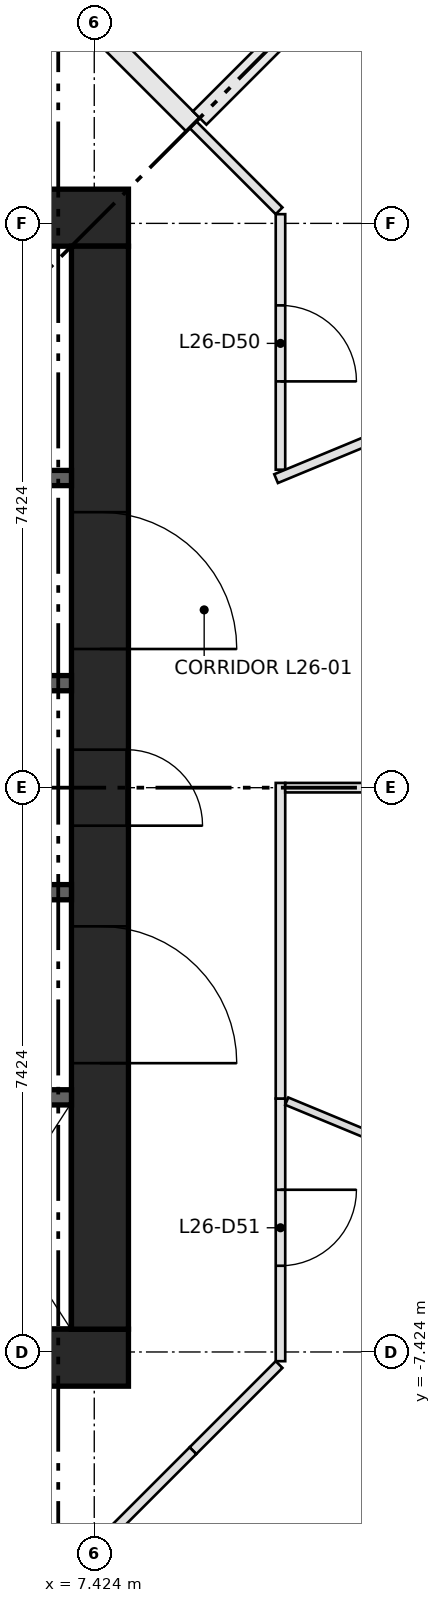
"""IFC4 building model, lengths in metres.
Left out: names, types, materials, properties, quantities, classifications, styles, units other than length and angle.
Written with IfcOpenShell. Run it as: python <this file> out.ifc"""

import sys

from ifc_helpers import new_model, si_unit, direction, frame, frame_2d, origin, place, context, subcontext, project, spatial, rectangle, extrude, element, fill, save


model = new_model("IFC4")
c1 = context("Model", 3, precision=1e-05, world=origin(), true_north=direction((0.0, 1.0)))
c2 = subcontext(c1, "Body", "Model", "MODEL_VIEW")
j1 = project(units=[si_unit("LENGTHUNIT", "METRE"), si_unit("PLANEANGLEUNIT", "RADIAN")], contexts=[c1])
p1 = place(None, origin())
s1 = spatial("IfcSite", under=j1, at=p1, CompositionType="ELEMENT")
p2 = place(p1, origin())
s2 = spatial("IfcBuilding", under=s1, at=p2, CompositionType="ELEMENT")
p3 = place(p2, frame((0.0, 0.0, 101.95)))
s3 = spatial("IfcBuildingStorey", under=s2, at=p3, CompositionType="ELEMENT", Elevation=101.95)
for number, where, z_axis, x_axis in (
    (1, (-7.874, -7.499, 0.0), (0.0, 0.0, 1.0), (1.0, 0.0, 0.0)),
    (2, (-7.874, 7.499, 0.0), (0.0, 0.0, 1.0), (1.0, 0.0, 0.0)),
):
    element("IfcWall", number, at=place(p3, frame(where, z_axis=z_axis, x_axis=x_axis)), inside=s3, PredefinedType="SHEAR", context=c2, shape_type="SweptSolid", body=[
        extrude(rectangle(XDim=15.748, YDim=0.75, at=frame_2d((7.874, 0.0))), origin(), (0.0, 0.0, 1.0), 3.65),
    ])
p4 = place(p3, frame((7.499, -7.124, 0.0), z_axis=(0.0, 0.0, 1.0), x_axis=(0.0, 1.0, 0.0)))
e3 = element("IfcWall", 3, at=p4, inside=s3, PredefinedType="SHEAR", context=c2, shape_type="SweptSolid", body=[
    extrude(rectangle(XDim=14.248, YDim=0.75, at=frame_2d((7.124, 0.0))), origin(), (0.0, 0.0, 1.0), 3.65),
])
p5 = place(p4, frame((6.624, 0.0, 0.0)))
e4 = element("IfcOpeningElement", 4, at=p5, cuts=e3, PredefinedType="OPENING", context=c2, shape_type="SweptSolid", body=[
    extrude(rectangle(XDim=1.0, YDim=2.1, at=frame_2d((0.5, 1.05))), frame((0.0, 0.385, 0.0), z_axis=(0.0, -1.0, 0.0), x_axis=(1.0, 0.0, 0.0)), (0.0, 0.0, 1.0), 0.77),
])
p6 = place(p4, frame((3.5, 0.0, 0.0)))
e5 = element("IfcOpeningElement", 5, at=p6, cuts=e3, PredefinedType="OPENING", context=c2, shape_type="SweptSolid", body=[
    extrude(rectangle(XDim=1.8, YDim=2.1, at=frame_2d((0.9, 1.05))), frame((0.0, 0.385, 0.0), z_axis=(0.0, -1.0, 0.0), x_axis=(1.0, 0.0, 0.0)), (0.0, 0.0, 1.0), 0.77),
])
p7 = place(p4, frame((8.948, 0.0, 0.0)))
e6 = element("IfcOpeningElement", 6, at=p7, cuts=e3, PredefinedType="OPENING", context=c2, shape_type="SweptSolid", body=[
    extrude(rectangle(XDim=1.8, YDim=2.1, at=frame_2d((0.9, 1.05))), frame((0.0, 0.385, 0.0), z_axis=(0.0, -1.0, 0.0), x_axis=(1.0, 0.0, 0.0)), (0.0, 0.0, 1.0), 0.77),
])
p8 = place(p3, frame((-7.124, -4.074, 0.0), z_axis=(0.0, 0.0, 1.0), x_axis=(1.0, 0.0, 0.0)))
e7 = element("IfcWall", 7, at=p8, inside=s3, PredefinedType="SHEAR", context=c2, shape_type="SweptSolid", body=[
    extrude(rectangle(XDim=14.248, YDim=0.2, at=frame_2d((7.124, 0.0))), origin(), (0.0, 0.0, 1.0), 3.3),
])
p9 = place(p8, frame((1.069, 0.0, 0.0)))
e8 = element("IfcOpeningElement", 8, at=p9, cuts=e7, PredefinedType="OPENING", context=c2, shape_type="SweptSolid", body=[
    extrude(rectangle(XDim=1.1, YDim=2.1, at=frame_2d((0.55, 1.05))), frame((0.0, 0.11, 0.0), z_axis=(0.0, -1.0, 0.0), x_axis=(1.0, 0.0, 0.0)), (0.0, 0.0, 1.0), 0.22),
])
p10 = place(p8, frame((4.206, 0.0, 0.0)))
e9 = element("IfcOpeningElement", 9, at=p10, cuts=e7, PredefinedType="OPENING", context=c2, shape_type="SweptSolid", body=[
    extrude(rectangle(XDim=1.1, YDim=2.1, at=frame_2d((0.55, 1.05))), frame((0.0, 0.11, 0.0), z_axis=(0.0, -1.0, 0.0), x_axis=(1.0, 0.0, 0.0)), (0.0, 0.0, 1.0), 0.22),
])
p11 = place(p8, frame((6.808, 0.0, 0.0)))
e10 = element("IfcOpeningElement", 10, at=p11, cuts=e7, PredefinedType="OPENING", context=c2, shape_type="SweptSolid", body=[
    extrude(rectangle(XDim=1.0, YDim=2.1, at=frame_2d((0.5, 1.05))), frame((0.0, 0.11, 0.0), z_axis=(0.0, -1.0, 0.0), x_axis=(1.0, 0.0, 0.0)), (0.0, 0.0, 1.0), 0.22),
])
p12 = place(p8, frame((8.777, 0.0, 0.0)))
e11 = element("IfcOpeningElement", 11, at=p12, cuts=e7, PredefinedType="OPENING", context=c2, shape_type="SweptSolid", body=[
    extrude(rectangle(XDim=1.0, YDim=2.1, at=frame_2d((0.5, 1.05))), frame((0.0, 0.11, 0.0), z_axis=(0.0, -1.0, 0.0), x_axis=(1.0, 0.0, 0.0)), (0.0, 0.0, 1.0), 0.22),
])
p13 = place(p8, frame((10.745, 0.0, 0.0)))
e12 = element("IfcOpeningElement", 12, at=p13, cuts=e7, PredefinedType="OPENING", context=c2, shape_type="SweptSolid", body=[
    extrude(rectangle(XDim=1.0, YDim=2.1, at=frame_2d((0.5, 1.05))), frame((0.0, 0.11, 0.0), z_axis=(0.0, -1.0, 0.0), x_axis=(1.0, 0.0, 0.0)), (0.0, 0.0, 1.0), 0.22),
])
p14 = place(p8, frame((12.714, 0.0, 0.0)))
e13 = element("IfcOpeningElement", 13, at=p14, cuts=e7, PredefinedType="OPENING", context=c2, shape_type="SweptSolid", body=[
    extrude(rectangle(XDim=1.0, YDim=2.1, at=frame_2d((0.5, 1.05))), frame((0.0, 0.11, 0.0), z_axis=(0.0, -1.0, 0.0), x_axis=(1.0, 0.0, 0.0)), (0.0, 0.0, 1.0), 0.22),
])
p15 = place(p3, frame((0.0, 4.074, 0.0), z_axis=(0.0, 0.0, 1.0), x_axis=(1.0, 0.0, 0.0)))
e14 = element("IfcWall", 14, at=p15, inside=s3, PredefinedType="SHEAR", context=c2, shape_type="SweptSolid", body=[
    extrude(rectangle(XDim=7.124, YDim=0.2, at=frame_2d((3.562, 0.0))), origin(), (0.0, 0.0, 1.0), 3.3),
])
p16 = place(p15, frame((0.754, 0.0, 0.0)))
e15 = element("IfcOpeningElement", 15, at=p16, cuts=e14, PredefinedType="OPENING", context=c2, shape_type="SweptSolid", body=[
    extrude(rectangle(XDim=1.0, YDim=2.1, at=frame_2d((0.5, 1.05))), frame((0.0, 0.11, 0.0), z_axis=(0.0, -1.0, 0.0), x_axis=(1.0, 0.0, 0.0)), (0.0, 0.0, 1.0), 0.22),
])
p17 = place(p15, frame((3.407, 0.0, 0.0)))
e16 = element("IfcOpeningElement", 16, at=p17, cuts=e14, PredefinedType="OPENING", context=c2, shape_type="SweptSolid", body=[
    extrude(rectangle(XDim=1.0, YDim=2.1, at=frame_2d((0.5, 1.05))), frame((0.0, 0.11, 0.0), z_axis=(0.0, -1.0, 0.0), x_axis=(1.0, 0.0, 0.0)), (0.0, 0.0, 1.0), 0.22),
])
p18 = place(p15, frame((5.79, 0.0, 0.0)))
e17 = element("IfcOpeningElement", 17, at=p18, cuts=e14, PredefinedType="OPENING", context=c2, shape_type="SweptSolid", body=[
    extrude(rectangle(XDim=0.8, YDim=2.1, at=frame_2d((0.4, 1.05))), frame((0.0, 0.11, 0.0), z_axis=(0.0, -1.0, 0.0), x_axis=(1.0, 0.0, 0.0)), (0.0, 0.0, 1.0), 0.22),
])
for number, where, z_axis, x_axis in (
    (18, (4.374, -1.375, 0.0), (0.0, 0.0, 1.0), (1.0, 0.0, 0.0)),
    (19, (4.374, 1.375, 0.0), (0.0, 0.0, 1.0), (1.0, 0.0, 0.0)),
):
    element("IfcWall", number, at=place(p3, frame(where, z_axis=z_axis, x_axis=x_axis)), inside=s3, PredefinedType="SHEAR", context=c2, shape_type="SweptSolid", body=[
        extrude(rectangle(XDim=2.75, YDim=0.2, at=frame_2d((1.375, 0.0))), origin(), (0.0, 0.0, 1.0), 3.3),
    ])
p19 = place(p3, frame((8.722, 8.722, 0.0), z_axis=(0.0, 0.0, 1.0), x_axis=(0.70718294931, -0.707030604857, 0.0)))
e20 = element("IfcWall", 20, at=p19, inside=s3, PredefinedType="PARTITIONING", context=c2, shape_type="SweptSolid", body=[
    extrude(rectangle(XDim=1.603, YDim=0.125, at=frame_2d((0.801, 0.0))), origin(), (0.0, 0.0, 1.0), 3.3),
])
p20 = place(p3, frame((9.874, 7.545, 0.0), z_axis=(0.0, 0.0, 1.0), x_axis=(0.0, -1.0, 0.0)))
e21 = element("IfcWall", 21, at=p20, inside=s3, PredefinedType="PARTITIONING", context=c2, shape_type="SweptSolid", body=[
    extrude(rectangle(XDim=3.362, YDim=0.125, at=frame_2d((1.681, 0.0))), origin(), (0.0, 0.0, 1.0), 3.3),
])
p21 = place(p20, frame((1.2, 0.0, 0.0)))
e22 = element("IfcOpeningElement", 22, at=p21, cuts=e21, PredefinedType="OPENING", context=c2, shape_type="SweptSolid", body=[
    extrude(rectangle(XDim=1.0, YDim=2.1, at=frame_2d((0.5, 1.05))), frame((0.0, 0.073, 0.0), z_axis=(0.0, -1.0, 0.0), x_axis=(1.0, 0.0, 0.0)), (0.0, 0.0, 1.0), 0.145),
])
p22 = place(p3, frame((9.856, -7.589, 0.0), z_axis=(0.0, 0.0, 1.0), x_axis=(-0.70718294931, -0.707030604857, 0.0)))
e23 = element("IfcWall", 23, at=p22, inside=s3, PredefinedType="PARTITIONING", context=c2, shape_type="SweptSolid", body=[
    extrude(rectangle(XDim=1.603, YDim=0.125, at=frame_2d((0.801, 0.0))), origin(), (0.0, 0.0, 1.0), 3.3),
])
p23 = place(p3, frame((9.874, -4.09, 0.0), z_axis=(0.0, 0.0, 1.0), x_axis=(0.0, -1.0, 0.0)))
e24 = element("IfcWall", 24, at=p23, inside=s3, PredefinedType="PARTITIONING", context=c2, shape_type="SweptSolid", body=[
    extrude(rectangle(XDim=3.455, YDim=0.125, at=frame_2d((1.728, 0.0))), origin(), (0.0, 0.0, 1.0), 3.3),
])
p24 = place(p23, frame((1.2, 0.0, 0.0)))
e25 = element("IfcOpeningElement", 25, at=p24, cuts=e24, PredefinedType="OPENING", context=c2, shape_type="SweptSolid", body=[
    extrude(rectangle(XDim=1.0, YDim=2.1, at=frame_2d((0.5, 1.05))), frame((0.0, 0.073, 0.0), z_axis=(0.0, -1.0, 0.0), x_axis=(1.0, 0.0, 0.0)), (0.0, 0.0, 1.0), 0.145),
])
p25 = place(p3, frame((9.874, 0.062, 0.0), z_axis=(0.0, 0.0, 1.0), x_axis=(0.0, -1.0, 0.0)))
e26 = element("IfcWall", 26, at=p25, inside=s3, PredefinedType="PARTITIONING", context=c2, shape_type="SweptSolid", body=[
    extrude(rectangle(XDim=4.152, YDim=0.125, at=frame_2d((2.076, 0.0))), origin(), (0.0, 0.0, 1.0), 3.3),
])
p26 = place(p3, frame((7.608, 9.837, 0.0), z_axis=(0.0, 0.0, 1.0), x_axis=(0.707029353672, -0.707184200224, 0.0)))
e27 = element("IfcWall", 27, at=p26, inside=s3, PredefinedType="PARTITIONING", context=c2, shape_type="SweptSolid", body=[
    extrude(rectangle(XDim=1.577, YDim=0.25, at=frame_2d((0.788, 0.0))), origin(), (0.0, 0.0, 1.0), 3.3),
])
p27 = place(p3, frame((8.722, -8.722, 0.0), z_axis=(0.0, 0.0, 1.0), x_axis=(-0.707030604857, -0.70718294931, 0.0)))
e28 = element("IfcWall", 28, at=p27, inside=s3, PredefinedType="PARTITIONING", context=c2, shape_type="SweptSolid", body=[
    extrude(rectangle(XDim=1.603, YDim=0.125, at=frame_2d((0.801, 0.0))), origin(), (0.0, 0.0, 1.0), 3.3),
])
p28 = place(p3, frame((9.816, 4.066, 0.0), z_axis=(0.0, 0.0, 1.0), x_axis=(0.923881608957, 0.382678419342, 0.0)))
e29 = element("IfcWall", 29, at=p28, inside=s3, PredefinedType="PARTITIONING", context=c2, shape_type="SweptSolid", body=[
    extrude(rectangle(XDim=3.895, YDim=0.125, at=frame_2d((1.947, 0.0))), origin(), (0.0, 0.0, 1.0), 3.3),
])
p29 = place(p3, frame((14.52, 0.0, 0.0), z_axis=(0.0, 0.0, 1.0), x_axis=(-1.0, 0.0, 0.0)))
e30 = element("IfcWall", 30, at=p29, inside=s3, PredefinedType="PARTITIONING", context=c2, shape_type="SweptSolid", body=[
    extrude(rectangle(XDim=4.583, YDim=0.125, at=frame_2d((2.292, 0.0))), origin(), (0.0, 0.0, 1.0), 3.3),
])
p30 = place(p29, frame((1.8, 0.0, 0.0)))
e31 = element("IfcOpeningElement", 31, at=p30, cuts=e30, PredefinedType="OPENING", context=c2, shape_type="SweptSolid", body=[
    extrude(rectangle(XDim=1.0, YDim=2.1, at=frame_2d((0.5, 1.05))), frame((0.0, 0.073, 0.0), z_axis=(0.0, -1.0, 0.0), x_axis=(1.0, 0.0, 0.0)), (0.0, 0.0, 1.0), 0.145),
])
p31 = place(p3, frame((12.792, 12.792, 0.0), z_axis=(0.0, 0.0, 1.0), x_axis=(-0.707106781187, -0.707106781187, 0.0)))
e32 = element("IfcWall", 32, at=p31, inside=s3, PredefinedType="PARTITIONING", context=c2, shape_type="SweptSolid", body=[
    extrude(rectangle(XDim=5.63, YDim=0.25, at=frame_2d((2.815, 0.0))), origin(), (0.0, 0.0, 1.0), 3.3),
])
p32 = place(p3, frame((9.957, -4.124, 0.0), z_axis=(0.0, 0.0, 1.0), x_axis=(0.923887259949, -0.382664776147, 0.0)))
e33 = element("IfcWall", 33, at=p32, inside=s3, PredefinedType="PARTITIONING", context=c2, shape_type="SweptSolid", body=[
    extrude(rectangle(XDim=3.743, YDim=0.105, at=frame_2d((1.872, 0.0))), origin(), (0.0, 0.0, 1.0), 3.3),
])
p33 = place(p5, frame((1.0, 0.0, 0.0), z_axis=(0.0, 0.0, 1.0), x_axis=(-1.0, 0.0, 0.0)))
e34 = element("IfcDoor", 34, at=p33, inside=s3, OperationType="SINGLE_SWING_LEFT", PredefinedType="DOOR", context=c2, shape_type="SweptSolid", body=[
    extrude(rectangle(XDim=1.0, YDim=2.1, at=frame_2d((0.5, 1.05))), frame((0.0, 0.375, 0.0), z_axis=(0.0, -1.0, 0.0), x_axis=(1.0, 0.0, 0.0)), (0.0, 0.0, 1.0), 0.05),
])
fill(e4, e34)
p34 = place(p6, frame((1.8, 0.0, 0.0), z_axis=(0.0, 0.0, 1.0), x_axis=(-1.0, 0.0, 0.0)))
e35 = element("IfcDoor", 35, at=p34, inside=s3, OperationType="DOUBLE_DOOR_SINGLE_SWING", PredefinedType="DOOR", context=c2, shape_type="SweptSolid", body=[
    extrude(rectangle(XDim=1.8, YDim=2.1, at=frame_2d((0.9, 1.05))), frame((0.0, 0.025, 0.0), z_axis=(0.0, -1.0, 0.0), x_axis=(1.0, 0.0, 0.0)), (0.0, 0.0, 1.0), 0.05),
])
fill(e5, e35)
p35 = place(p7, frame((1.8, 0.0, 0.0), z_axis=(0.0, 0.0, 1.0), x_axis=(-1.0, 0.0, 0.0)))
e36 = element("IfcDoor", 36, at=p35, inside=s3, OperationType="DOUBLE_DOOR_SINGLE_SWING", PredefinedType="DOOR", context=c2, shape_type="SweptSolid", body=[
    extrude(rectangle(XDim=1.8, YDim=2.1, at=frame_2d((0.9, 1.05))), frame((0.0, 0.025, 0.0), z_axis=(0.0, -1.0, 0.0), x_axis=(1.0, 0.0, 0.0)), (0.0, 0.0, 1.0), 0.05),
])
fill(e6, e36)
p36 = place(p21, origin())
e37 = element("IfcDoor", 37, at=p36, inside=s3, OperationType="SINGLE_SWING_RIGHT", PredefinedType="DOOR", context=c2, shape_type="SweptSolid", body=[
    extrude(rectangle(XDim=1.0, YDim=2.1, at=frame_2d((0.5, 1.05))), frame((0.0, 0.025, 0.0), z_axis=(0.0, -1.0, 0.0), x_axis=(1.0, 0.0, 0.0)), (0.0, 0.0, 1.0), 0.05),
])
fill(e22, e37)
p37 = place(p24, origin())
e38 = element("IfcDoor", 38, at=p37, inside=s3, OperationType="SINGLE_SWING_LEFT", PredefinedType="DOOR", context=c2, shape_type="SweptSolid", body=[
    extrude(rectangle(XDim=1.0, YDim=2.1, at=frame_2d((0.5, 1.05))), frame((0.0, 0.025, 0.0), z_axis=(0.0, -1.0, 0.0), x_axis=(1.0, 0.0, 0.0)), (0.0, 0.0, 1.0), 0.05),
])
fill(e25, e38)
save(model, sys.argv[1])
